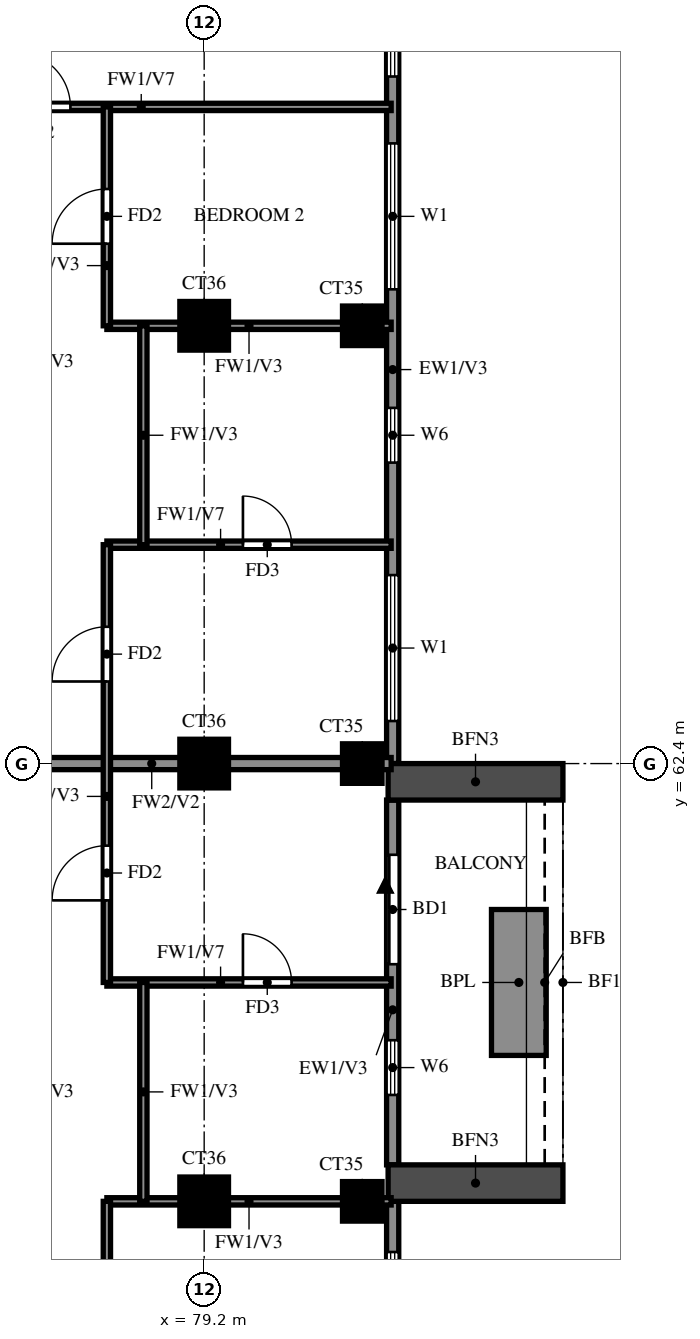
"""IFC4 building model, lengths in metres.
Left out: names, types, materials, properties, quantities, classifications, styles, units other than length and angle.
Written with IfcOpenShell. Run it as: python <this file> out.ifc"""

import sys

from ifc_helpers import new_model, si_unit, direction, frame, frame_2d, origin, origin_2d, place, context, subcontext, project, spatial, rectangle, extrude, source, transform, mapped, element, fill, save


model = new_model("IFC4")
c1 = context("Model", 3, precision=1e-05, world=origin(), true_north=direction((0.0, 1.0)))
c2 = subcontext(c1, "Body", "Model", "MODEL_VIEW")
j1 = project(units=[si_unit("LENGTHUNIT", "METRE"), si_unit("PLANEANGLEUNIT", "RADIAN")], contexts=[c1])
p1 = place(None, origin())
s1 = spatial("IfcSite", under=j1, at=p1, CompositionType="ELEMENT")
p2 = place(p1, origin())
s2 = spatial("IfcBuilding", under=s1, at=p2, CompositionType="ELEMENT")
p3 = place(p2, frame((0.0, 0.0, 239.5)))
s3 = spatial("IfcBuildingStorey", under=s2, at=p3, CompositionType="ELEMENT", Elevation=239.5)
m1 = source(origin(), c2, "Body", "SweptSolid", [
    extrude(rectangle(XDim=0.8, YDim=0.8, at=origin_2d()), origin(), (0.0, 0.0, 1.0), 3.22),
])
p4 = place(p3, frame((79.2, 55.2, 0.0), z_axis=(0.0, 0.0, 1.0), x_axis=(1.0, 0.0, 0.0)))
e1 = element("IfcColumn", 1, at=p4, inside=s3, PredefinedType="COLUMN", context=c2, shape_type="MappedRepresentation", body=[
    mapped(m1, transform((0.0, 0.0, 0.0))),
])
m2 = source(origin(), c2, "Body", "SweptSolid", [
    extrude(rectangle(XDim=0.65, YDim=0.65, at=origin_2d()), origin(), (0.0, 0.0, 1.0), 3.22),
])
p5 = place(p3, frame((81.8, 55.2, 0.0), z_axis=(0.0, 0.0, 1.0), x_axis=(1.0, 0.0, 0.0)))
e2 = element("IfcColumn", 2, at=p5, inside=s3, PredefinedType="COLUMN", context=c2, shape_type="MappedRepresentation", body=[
    mapped(m2, transform((0.0, 0.0, 0.0))),
])
p6 = place(p3, frame((79.2, 62.4, 0.0), z_axis=(0.0, 0.0, 1.0), x_axis=(1.0, 0.0, 0.0)))
e3 = element("IfcColumn", 3, at=p6, inside=s3, PredefinedType="COLUMN", context=c2, shape_type="MappedRepresentation", body=[
    mapped(m1, transform((0.0, 0.0, 0.0))),
])
p7 = place(p3, frame((81.8, 62.4, 0.0), z_axis=(0.0, 0.0, 1.0), x_axis=(1.0, 0.0, 0.0)))
e4 = element("IfcColumn", 4, at=p7, inside=s3, PredefinedType="COLUMN", context=c2, shape_type="MappedRepresentation", body=[
    mapped(m2, transform((0.0, 0.0, 0.0))),
])
p8 = place(p3, frame((79.2, 69.6, 0.0), z_axis=(0.0, 0.0, 1.0), x_axis=(1.0, 0.0, 0.0)))
e5 = element("IfcColumn", 5, at=p8, inside=s3, PredefinedType="COLUMN", context=c2, shape_type="MappedRepresentation", body=[
    mapped(m1, transform((0.0, 0.0, 0.0))),
])
p9 = place(p3, frame((81.8, 69.6, 0.0), z_axis=(0.0, 0.0, 1.0), x_axis=(1.0, 0.0, 0.0)))
e6 = element("IfcColumn", 6, at=p9, inside=s3, PredefinedType="COLUMN", context=c2, shape_type="MappedRepresentation", body=[
    mapped(m2, transform((0.0, 0.0, 0.0))),
])
p10 = place(p3, frame((82.3, 48.2, 0.0), z_axis=(0.0, 0.0, 1.0), x_axis=(0.0, 1.0, 0.0)))
e7 = element("IfcWall", 7, at=p10, inside=s3, PredefinedType="SOLIDWALL", context=c2, shape_type="SweptSolid", body=[
    extrude(rectangle(XDim=7.0, YDim=0.2, at=frame_2d((3.5, 0.0))), origin(), (0.0, 0.0, 1.0), 3.22),
])
p11 = place(p10, frame((0.833, 0.0, 0.6)))
e8 = element("IfcOpeningElement", 8, at=p11, cuts=e7, PredefinedType="OPENING", context=c2, shape_type="SweptSolid", body=[
    extrude(rectangle(XDim=2.4, YDim=2.4, at=frame_2d((1.2, 1.2))), frame((0.0, 0.11, 0.0), z_axis=(0.0, -1.0, 0.0), x_axis=(1.0, 0.0, 0.0)), (0.0, 0.0, 1.0), 0.22),
])
p12 = place(p10, frame((3.767, 0.0, 0.6)))
e9 = element("IfcOpeningElement", 9, at=p12, cuts=e7, PredefinedType="OPENING", context=c2, shape_type="SweptSolid", body=[
    extrude(rectangle(XDim=2.4, YDim=2.4, at=frame_2d((1.2, 1.2))), frame((0.0, 0.11, 0.0), z_axis=(0.0, -1.0, 0.0), x_axis=(1.0, 0.0, 0.0)), (0.0, 0.0, 1.0), 0.22),
])
p13 = place(p3, frame((82.3, 55.8, 0.0), z_axis=(0.0, 0.0, 1.0), x_axis=(0.0, 1.0, 0.0)))
e10 = element("IfcWall", 10, at=p13, inside=s3, PredefinedType="SOLIDWALL", context=c2, shape_type="SweptSolid", body=[
    extrude(rectangle(XDim=6.0, YDim=0.2, at=frame_2d((3.0, 0.0))), origin(), (0.0, 0.0, 1.0), 3.22),
])
p14 = place(p13, frame((3.3, 0.0, 0.0)))
e11 = element("IfcOpeningElement", 11, at=p14, cuts=e10, PredefinedType="OPENING", context=c2, shape_type="SweptSolid", body=[
    extrude(rectangle(XDim=1.8, YDim=2.4, at=frame_2d((0.9, 1.2))), frame((0.0, 0.11, 0.0), z_axis=(0.0, -1.0, 0.0), x_axis=(1.0, 0.0, 0.0)), (0.0, 0.0, 1.0), 0.22),
])
p15 = place(p13, frame((1.15, 0.0, 1.5)))
e12 = element("IfcOpeningElement", 12, at=p15, cuts=e10, PredefinedType="OPENING", context=c2, shape_type="SweptSolid", body=[
    extrude(rectangle(XDim=0.9, YDim=0.9, at=frame_2d((0.45, 0.45))), frame((0.0, 0.11, 0.0), z_axis=(0.0, -1.0, 0.0), x_axis=(1.0, 0.0, 0.0)), (0.0, 0.0, 1.0), 0.22),
])
p16 = place(p3, frame((82.3, 62.4, 0.0), z_axis=(0.0, 0.0, 1.0), x_axis=(0.0, 1.0, 0.0)))
e13 = element("IfcWall", 13, at=p16, inside=s3, PredefinedType="SOLIDWALL", context=c2, shape_type="SweptSolid", body=[
    extrude(rectangle(XDim=14.4, YDim=0.2, at=frame_2d((7.2, 0.0))), origin(), (0.0, 0.0, 1.0), 3.22),
])
p17 = place(p16, frame((0.7, 0.0, 0.6)))
e14 = element("IfcOpeningElement", 14, at=p17, cuts=e13, PredefinedType="OPENING", context=c2, shape_type="SweptSolid", body=[
    extrude(rectangle(XDim=2.4, YDim=2.4, at=frame_2d((1.2, 1.2))), frame((0.0, 0.11, 0.0), z_axis=(0.0, -1.0, 0.0), x_axis=(1.0, 0.0, 0.0)), (0.0, 0.0, 1.0), 0.22),
])
p18 = place(p16, frame((4.95, 0.0, 1.5)))
e15 = element("IfcOpeningElement", 15, at=p18, cuts=e13, PredefinedType="OPENING", context=c2, shape_type="SweptSolid", body=[
    extrude(rectangle(XDim=0.9, YDim=0.9, at=frame_2d((0.45, 0.45))), frame((0.0, 0.11, 0.0), z_axis=(0.0, -1.0, 0.0), x_axis=(1.0, 0.0, 0.0)), (0.0, 0.0, 1.0), 0.22),
])
p19 = place(p16, frame((7.8, 0.0, 0.6)))
e16 = element("IfcOpeningElement", 16, at=p19, cuts=e13, PredefinedType="OPENING", context=c2, shape_type="SweptSolid", body=[
    extrude(rectangle(XDim=2.4, YDim=2.4, at=frame_2d((1.2, 1.2))), frame((0.0, 0.11, 0.0), z_axis=(0.0, -1.0, 0.0), x_axis=(1.0, 0.0, 0.0)), (0.0, 0.0, 1.0), 0.22),
])
p20 = place(p16, frame((11.3, 0.0, 0.6)))
e17 = element("IfcOpeningElement", 17, at=p20, cuts=e13, PredefinedType="OPENING", context=c2, shape_type="SweptSolid", body=[
    extrude(rectangle(XDim=2.4, YDim=2.4, at=frame_2d((1.2, 1.2))), frame((0.0, 0.11, 0.0), z_axis=(0.0, -1.0, 0.0), x_axis=(1.0, 0.0, 0.0)), (0.0, 0.0, 1.0), 0.22),
])
for number, where, z_axis, x_axis in (
    (18, (82.225, 55.5, 0.0), (0.0, 0.0, 1.0), (1.0, 0.0, 0.0)),
    (19, (82.225, 62.1, 0.0), (0.0, 0.0, 1.0), (1.0, 0.0, 0.0)),
):
    element("IfcWall", number, at=place(p3, frame(where, z_axis=z_axis, x_axis=x_axis)), inside=s3, PredefinedType="SOLIDWALL", context=c2, shape_type="SweptSolid", body=[
        extrude(rectangle(XDim=2.875, YDim=0.6, at=frame_2d((1.438, 0.0))), origin(), (0.0, 0.0, 1.0), 2.85),
    ])
p21 = place(p3, frame((84.375, 57.6, 0.0), z_axis=(0.0, 0.0, 1.0), x_axis=(0.0, 1.0, 0.0)))
e20 = element("IfcWall", 20, at=p21, inside=s3, PredefinedType="SOLIDWALL", context=c2, shape_type="SweptSolid", body=[
    extrude(rectangle(XDim=2.4, YDim=0.9, at=frame_2d((1.2, 0.0))), origin(), (0.0, 0.0, 1.0), 0.9),
])
p22 = place(p3, frame((74.4, 62.4, 0.0), z_axis=(0.0, 0.0, 1.0), x_axis=(1.0, 0.0, 0.0)))
e21 = element("IfcWall", 21, at=p22, inside=s3, PredefinedType="SOLIDWALL", context=c2, shape_type="SweptSolid", body=[
    extrude(rectangle(XDim=7.875, YDim=0.2, at=frame_2d((3.938, 0.0))), origin(), (0.0, 0.0, 1.0), 3.22),
])
p23 = place(p3, frame((77.6, 55.2, 0.0), z_axis=(0.0, 0.0, 1.0), x_axis=(1.0, 0.0, 0.0)))
e22 = element("IfcWall", 22, at=p23, inside=s3, PredefinedType="PARTITIONING", context=c2, shape_type="SweptSolid", body=[
    extrude(rectangle(XDim=4.675, YDim=0.12, at=frame_2d((2.337, 0.0))), origin(), (0.0, 0.0, 1.0), 3.22),
])
p24 = place(p3, frame((77.6, 58.8, 0.0), z_axis=(0.0, 0.0, 1.0), x_axis=(1.0, 0.0, 0.0)))
e23 = element("IfcWall", 23, at=p24, inside=s3, PredefinedType="PARTITIONING", context=c2, shape_type="SweptSolid", body=[
    extrude(rectangle(XDim=4.675, YDim=0.12, at=frame_2d((2.337, 0.0))), origin(), (0.0, 0.0, 1.0), 2.32),
])
p25 = place(p24, frame((2.238, 0.0, 0.0)))
e24 = element("IfcOpeningElement", 24, at=p25, cuts=e23, PredefinedType="OPENING", context=c2, shape_type="SweptSolid", body=[
    extrude(rectangle(XDim=0.8, YDim=2.1, at=frame_2d((0.4, 1.05))), frame((0.0, 0.07, 0.0), z_axis=(0.0, -1.0, 0.0), x_axis=(1.0, 0.0, 0.0)), (0.0, 0.0, 1.0), 0.14),
])
p26 = place(p3, frame((77.6, 66.0, 0.0), z_axis=(0.0, 0.0, 1.0), x_axis=(1.0, 0.0, 0.0)))
e25 = element("IfcWall", 25, at=p26, inside=s3, PredefinedType="PARTITIONING", context=c2, shape_type="SweptSolid", body=[
    extrude(rectangle(XDim=4.675, YDim=0.12, at=frame_2d((2.337, 0.0))), origin(), (0.0, 0.0, 1.0), 2.32),
])
p27 = place(p26, frame((2.238, 0.0, 0.0)))
e26 = element("IfcOpeningElement", 26, at=p27, cuts=e25, PredefinedType="OPENING", context=c2, shape_type="SweptSolid", body=[
    extrude(rectangle(XDim=0.8, YDim=2.1, at=frame_2d((0.4, 1.05))), frame((0.0, 0.07, 0.0), z_axis=(0.0, -1.0, 0.0), x_axis=(1.0, 0.0, 0.0)), (0.0, 0.0, 1.0), 0.14),
])
p28 = place(p3, frame((77.6, 69.6, 0.0), z_axis=(0.0, 0.0, 1.0), x_axis=(1.0, 0.0, 0.0)))
e27 = element("IfcWall", 27, at=p28, inside=s3, PredefinedType="PARTITIONING", context=c2, shape_type="SweptSolid", body=[
    extrude(rectangle(XDim=4.675, YDim=0.12, at=frame_2d((2.337, 0.0))), origin(), (0.0, 0.0, 1.0), 3.22),
])
p29 = place(p3, frame((72.0, 73.2, 0.0), z_axis=(0.0, 0.0, 1.0), x_axis=(1.0, 0.0, 0.0)))
e28 = element("IfcWall", 28, at=p29, inside=s3, PredefinedType="PARTITIONING", context=c2, shape_type="SweptSolid", body=[
    extrude(rectangle(XDim=10.275, YDim=0.12, at=frame_2d((5.137, 0.0))), origin(), (0.0, 0.0, 1.0), 2.32),
])
p30 = place(p29, frame((4.1, 0.0, 0.0)))
e29 = element("IfcOpeningElement", 29, at=p30, cuts=e28, PredefinedType="OPENING", context=c2, shape_type="SweptSolid", body=[
    extrude(rectangle(XDim=0.9, YDim=2.1, at=frame_2d((0.45, 1.05))), frame((0.0, 0.07, 0.0), z_axis=(0.0, -1.0, 0.0), x_axis=(1.0, 0.0, 0.0)), (0.0, 0.0, 1.0), 0.14),
])
p31 = place(p3, frame((77.6, 48.125, 0.0), z_axis=(0.0, 0.0, 1.0), x_axis=(0.0, 1.0, 0.0)))
e30 = element("IfcWall", 30, at=p31, inside=s3, PredefinedType="PARTITIONING", context=c2, shape_type="SweptSolid", body=[
    extrude(rectangle(XDim=7.075, YDim=0.12, at=frame_2d((3.538, 0.0))), origin(), (0.0, 0.0, 1.0), 3.22),
])
p32 = place(p31, frame((2.788, 0.0, 0.0)))
e31 = element("IfcOpeningElement", 31, at=p32, cuts=e30, PredefinedType="OPENING", context=c2, shape_type="SweptSolid", body=[
    extrude(rectangle(XDim=1.5, YDim=2.1, at=frame_2d((0.75, 1.05))), frame((0.0, 0.07, 0.0), z_axis=(0.0, -1.0, 0.0), x_axis=(1.0, 0.0, 0.0)), (0.0, 0.0, 1.0), 0.14),
])
p33 = place(p3, frame((77.6, 58.8, 0.0), z_axis=(0.0, 0.0, 1.0), x_axis=(0.0, 1.0, 0.0)))
e32 = element("IfcWall", 32, at=p33, inside=s3, PredefinedType="PARTITIONING", context=c2, shape_type="SweptSolid", body=[
    extrude(rectangle(XDim=7.2, YDim=0.12, at=frame_2d((3.6, 0.0))), origin(), (0.0, 0.0, 1.0), 3.22),
])
p34 = place(p33, frame((1.35, 0.0, 0.0)))
e33 = element("IfcOpeningElement", 33, at=p34, cuts=e32, PredefinedType="OPENING", context=c2, shape_type="SweptSolid", body=[
    extrude(rectangle(XDim=0.9, YDim=2.1, at=frame_2d((0.45, 1.05))), frame((0.0, 0.07, 0.0), z_axis=(0.0, -1.0, 0.0), x_axis=(1.0, 0.0, 0.0)), (0.0, 0.0, 1.0), 0.14),
])
p35 = place(p33, frame((4.95, 0.0, 0.0)))
e34 = element("IfcOpeningElement", 34, at=p35, cuts=e32, PredefinedType="OPENING", context=c2, shape_type="SweptSolid", body=[
    extrude(rectangle(XDim=0.9, YDim=2.1, at=frame_2d((0.45, 1.05))), frame((0.0, 0.07, 0.0), z_axis=(0.0, -1.0, 0.0), x_axis=(1.0, 0.0, 0.0)), (0.0, 0.0, 1.0), 0.14),
])
p36 = place(p3, frame((77.6, 69.6, 0.0), z_axis=(0.0, 0.0, 1.0), x_axis=(0.0, 1.0, 0.0)))
e35 = element("IfcWall", 35, at=p36, inside=s3, PredefinedType="PARTITIONING", context=c2, shape_type="SweptSolid", body=[
    extrude(rectangle(XDim=3.6, YDim=0.12, at=frame_2d((1.8, 0.0))), origin(), (0.0, 0.0, 1.0), 3.22),
])
p37 = place(p36, frame((1.35, 0.0, 0.0)))
e36 = element("IfcOpeningElement", 36, at=p37, cuts=e35, PredefinedType="OPENING", context=c2, shape_type="SweptSolid", body=[
    extrude(rectangle(XDim=0.9, YDim=2.1, at=frame_2d((0.45, 1.05))), frame((0.0, 0.07, 0.0), z_axis=(0.0, -1.0, 0.0), x_axis=(1.0, 0.0, 0.0)), (0.0, 0.0, 1.0), 0.14),
])
for number, where, z_axis, x_axis in (
    (37, (78.2, 55.2, 0.0), (0.0, 0.0, 1.0), (0.0, 1.0, 0.0)),
    (38, (78.2, 66.0, 0.0), (0.0, 0.0, 1.0), (0.0, 1.0, 0.0)),
):
    element("IfcWall", number, at=place(p3, frame(where, z_axis=z_axis, x_axis=x_axis)), inside=s3, PredefinedType="PARTITIONING", context=c2, shape_type="SweptSolid", body=[
        extrude(rectangle(XDim=3.6, YDim=0.12, at=frame_2d((1.8, 0.0))), origin(), (0.0, 0.0, 1.0), 3.22),
    ])
p38 = place(p12, origin())
e39 = element("IfcWindow", 39, at=p38, inside=s3, PartitioningType="DOUBLE_PANEL_VERTICAL", PredefinedType="WINDOW", context=c2, shape_type="SweptSolid", body=[
    extrude(rectangle(XDim=2.4, YDim=2.4, at=frame_2d((1.2, 1.2))), frame((0.0, 0.03, 0.0), z_axis=(0.0, -1.0, 0.0), x_axis=(1.0, 0.0, 0.0)), (0.0, 0.0, 1.0), 0.06),
])
fill(e9, e39)
p39 = place(p14, origin())
e40 = element("IfcDoor", 40, at=p39, inside=s3, OperationType="DOUBLE_DOOR_SLIDING", PredefinedType="DOOR", context=c2, shape_type="SweptSolid", body=[
    extrude(rectangle(XDim=1.8, YDim=2.4, at=frame_2d((0.9, 1.2))), frame((0.0, 0.025, 0.0), z_axis=(0.0, -1.0, 0.0), x_axis=(1.0, 0.0, 0.0)), (0.0, 0.0, 1.0), 0.05),
])
fill(e11, e40)
p40 = place(p15, origin())
e41 = element("IfcWindow", 41, at=p40, inside=s3, PartitioningType="SINGLE_PANEL", PredefinedType="WINDOW", context=c2, shape_type="SweptSolid", body=[
    extrude(rectangle(XDim=0.9, YDim=0.9, at=frame_2d((0.45, 0.45))), frame((0.0, 0.03, 0.0), z_axis=(0.0, -1.0, 0.0), x_axis=(1.0, 0.0, 0.0)), (0.0, 0.0, 1.0), 0.06),
])
fill(e12, e41)
p41 = place(p17, origin())
e42 = element("IfcWindow", 42, at=p41, inside=s3, PartitioningType="DOUBLE_PANEL_VERTICAL", PredefinedType="WINDOW", context=c2, shape_type="SweptSolid", body=[
    extrude(rectangle(XDim=2.4, YDim=2.4, at=frame_2d((1.2, 1.2))), frame((0.0, 0.03, 0.0), z_axis=(0.0, -1.0, 0.0), x_axis=(1.0, 0.0, 0.0)), (0.0, 0.0, 1.0), 0.06),
])
fill(e14, e42)
p42 = place(p18, origin())
e43 = element("IfcWindow", 43, at=p42, inside=s3, PartitioningType="SINGLE_PANEL", PredefinedType="WINDOW", context=c2, shape_type="SweptSolid", body=[
    extrude(rectangle(XDim=0.9, YDim=0.9, at=frame_2d((0.45, 0.45))), frame((0.0, 0.03, 0.0), z_axis=(0.0, -1.0, 0.0), x_axis=(1.0, 0.0, 0.0)), (0.0, 0.0, 1.0), 0.06),
])
fill(e15, e43)
p43 = place(p19, origin())
e44 = element("IfcWindow", 44, at=p43, inside=s3, PartitioningType="DOUBLE_PANEL_VERTICAL", PredefinedType="WINDOW", context=c2, shape_type="SweptSolid", body=[
    extrude(rectangle(XDim=2.4, YDim=2.4, at=frame_2d((1.2, 1.2))), frame((0.0, 0.03, 0.0), z_axis=(0.0, -1.0, 0.0), x_axis=(1.0, 0.0, 0.0)), (0.0, 0.0, 1.0), 0.06),
])
fill(e16, e44)
p44 = place(p20, origin())
e45 = element("IfcWindow", 45, at=p44, inside=s3, PartitioningType="DOUBLE_PANEL_VERTICAL", PredefinedType="WINDOW", context=c2, shape_type="SweptSolid", body=[
    extrude(rectangle(XDim=2.4, YDim=2.4, at=frame_2d((1.2, 1.2))), frame((0.0, 0.03, 0.0), z_axis=(0.0, -1.0, 0.0), x_axis=(1.0, 0.0, 0.0)), (0.0, 0.0, 1.0), 0.06),
])
fill(e17, e45)
p45 = place(p34, origin())
e46 = element("IfcDoor", 46, at=p45, inside=s3, OperationType="SINGLE_SWING_LEFT", PredefinedType="DOOR", context=c2, shape_type="SweptSolid", body=[
    extrude(rectangle(XDim=0.9, YDim=2.1, at=frame_2d((0.45, 1.05))), frame((0.0, 0.025, 0.0), z_axis=(0.0, -1.0, 0.0), x_axis=(1.0, 0.0, 0.0)), (0.0, 0.0, 1.0), 0.05),
])
fill(e33, e46)
p46 = place(p25, origin())
e47 = element("IfcDoor", 47, at=p46, inside=s3, OperationType="SINGLE_SWING_LEFT", PredefinedType="DOOR", context=c2, shape_type="SweptSolid", body=[
    extrude(rectangle(XDim=0.8, YDim=2.1, at=frame_2d((0.4, 1.05))), frame((0.0, 0.025, 0.0), z_axis=(0.0, -1.0, 0.0), x_axis=(1.0, 0.0, 0.0)), (0.0, 0.0, 1.0), 0.05),
])
fill(e24, e47)
p47 = place(p35, origin())
e48 = element("IfcDoor", 48, at=p47, inside=s3, OperationType="SINGLE_SWING_LEFT", PredefinedType="DOOR", context=c2, shape_type="SweptSolid", body=[
    extrude(rectangle(XDim=0.9, YDim=2.1, at=frame_2d((0.45, 1.05))), frame((0.0, 0.025, 0.0), z_axis=(0.0, -1.0, 0.0), x_axis=(1.0, 0.0, 0.0)), (0.0, 0.0, 1.0), 0.05),
])
fill(e34, e48)
p48 = place(p27, origin())
e49 = element("IfcDoor", 49, at=p48, inside=s3, OperationType="SINGLE_SWING_RIGHT", PredefinedType="DOOR", context=c2, shape_type="SweptSolid", body=[
    extrude(rectangle(XDim=0.8, YDim=2.1, at=frame_2d((0.4, 1.05))), frame((0.0, 0.025, 0.0), z_axis=(0.0, -1.0, 0.0), x_axis=(1.0, 0.0, 0.0)), (0.0, 0.0, 1.0), 0.05),
])
fill(e26, e49)
p49 = place(p37, origin())
e50 = element("IfcDoor", 50, at=p49, inside=s3, OperationType="SINGLE_SWING_LEFT", PredefinedType="DOOR", context=c2, shape_type="SweptSolid", body=[
    extrude(rectangle(XDim=0.9, YDim=2.1, at=frame_2d((0.45, 1.05))), frame((0.0, 0.025, 0.0), z_axis=(0.0, -1.0, 0.0), x_axis=(1.0, 0.0, 0.0)), (0.0, 0.0, 1.0), 0.05),
])
fill(e36, e50)
p50 = place(p30, origin())
e51 = element("IfcDoor", 51, at=p50, inside=s3, OperationType="SINGLE_SWING_LEFT", PredefinedType="DOOR", context=c2, shape_type="SweptSolid", body=[
    extrude(rectangle(XDim=0.9, YDim=2.1, at=frame_2d((0.45, 1.05))), frame((0.0, 0.025, 0.0), z_axis=(0.0, -1.0, 0.0), x_axis=(1.0, 0.0, 0.0)), (0.0, 0.0, 1.0), 0.05),
])
fill(e29, e51)
save(model, sys.argv[1])
